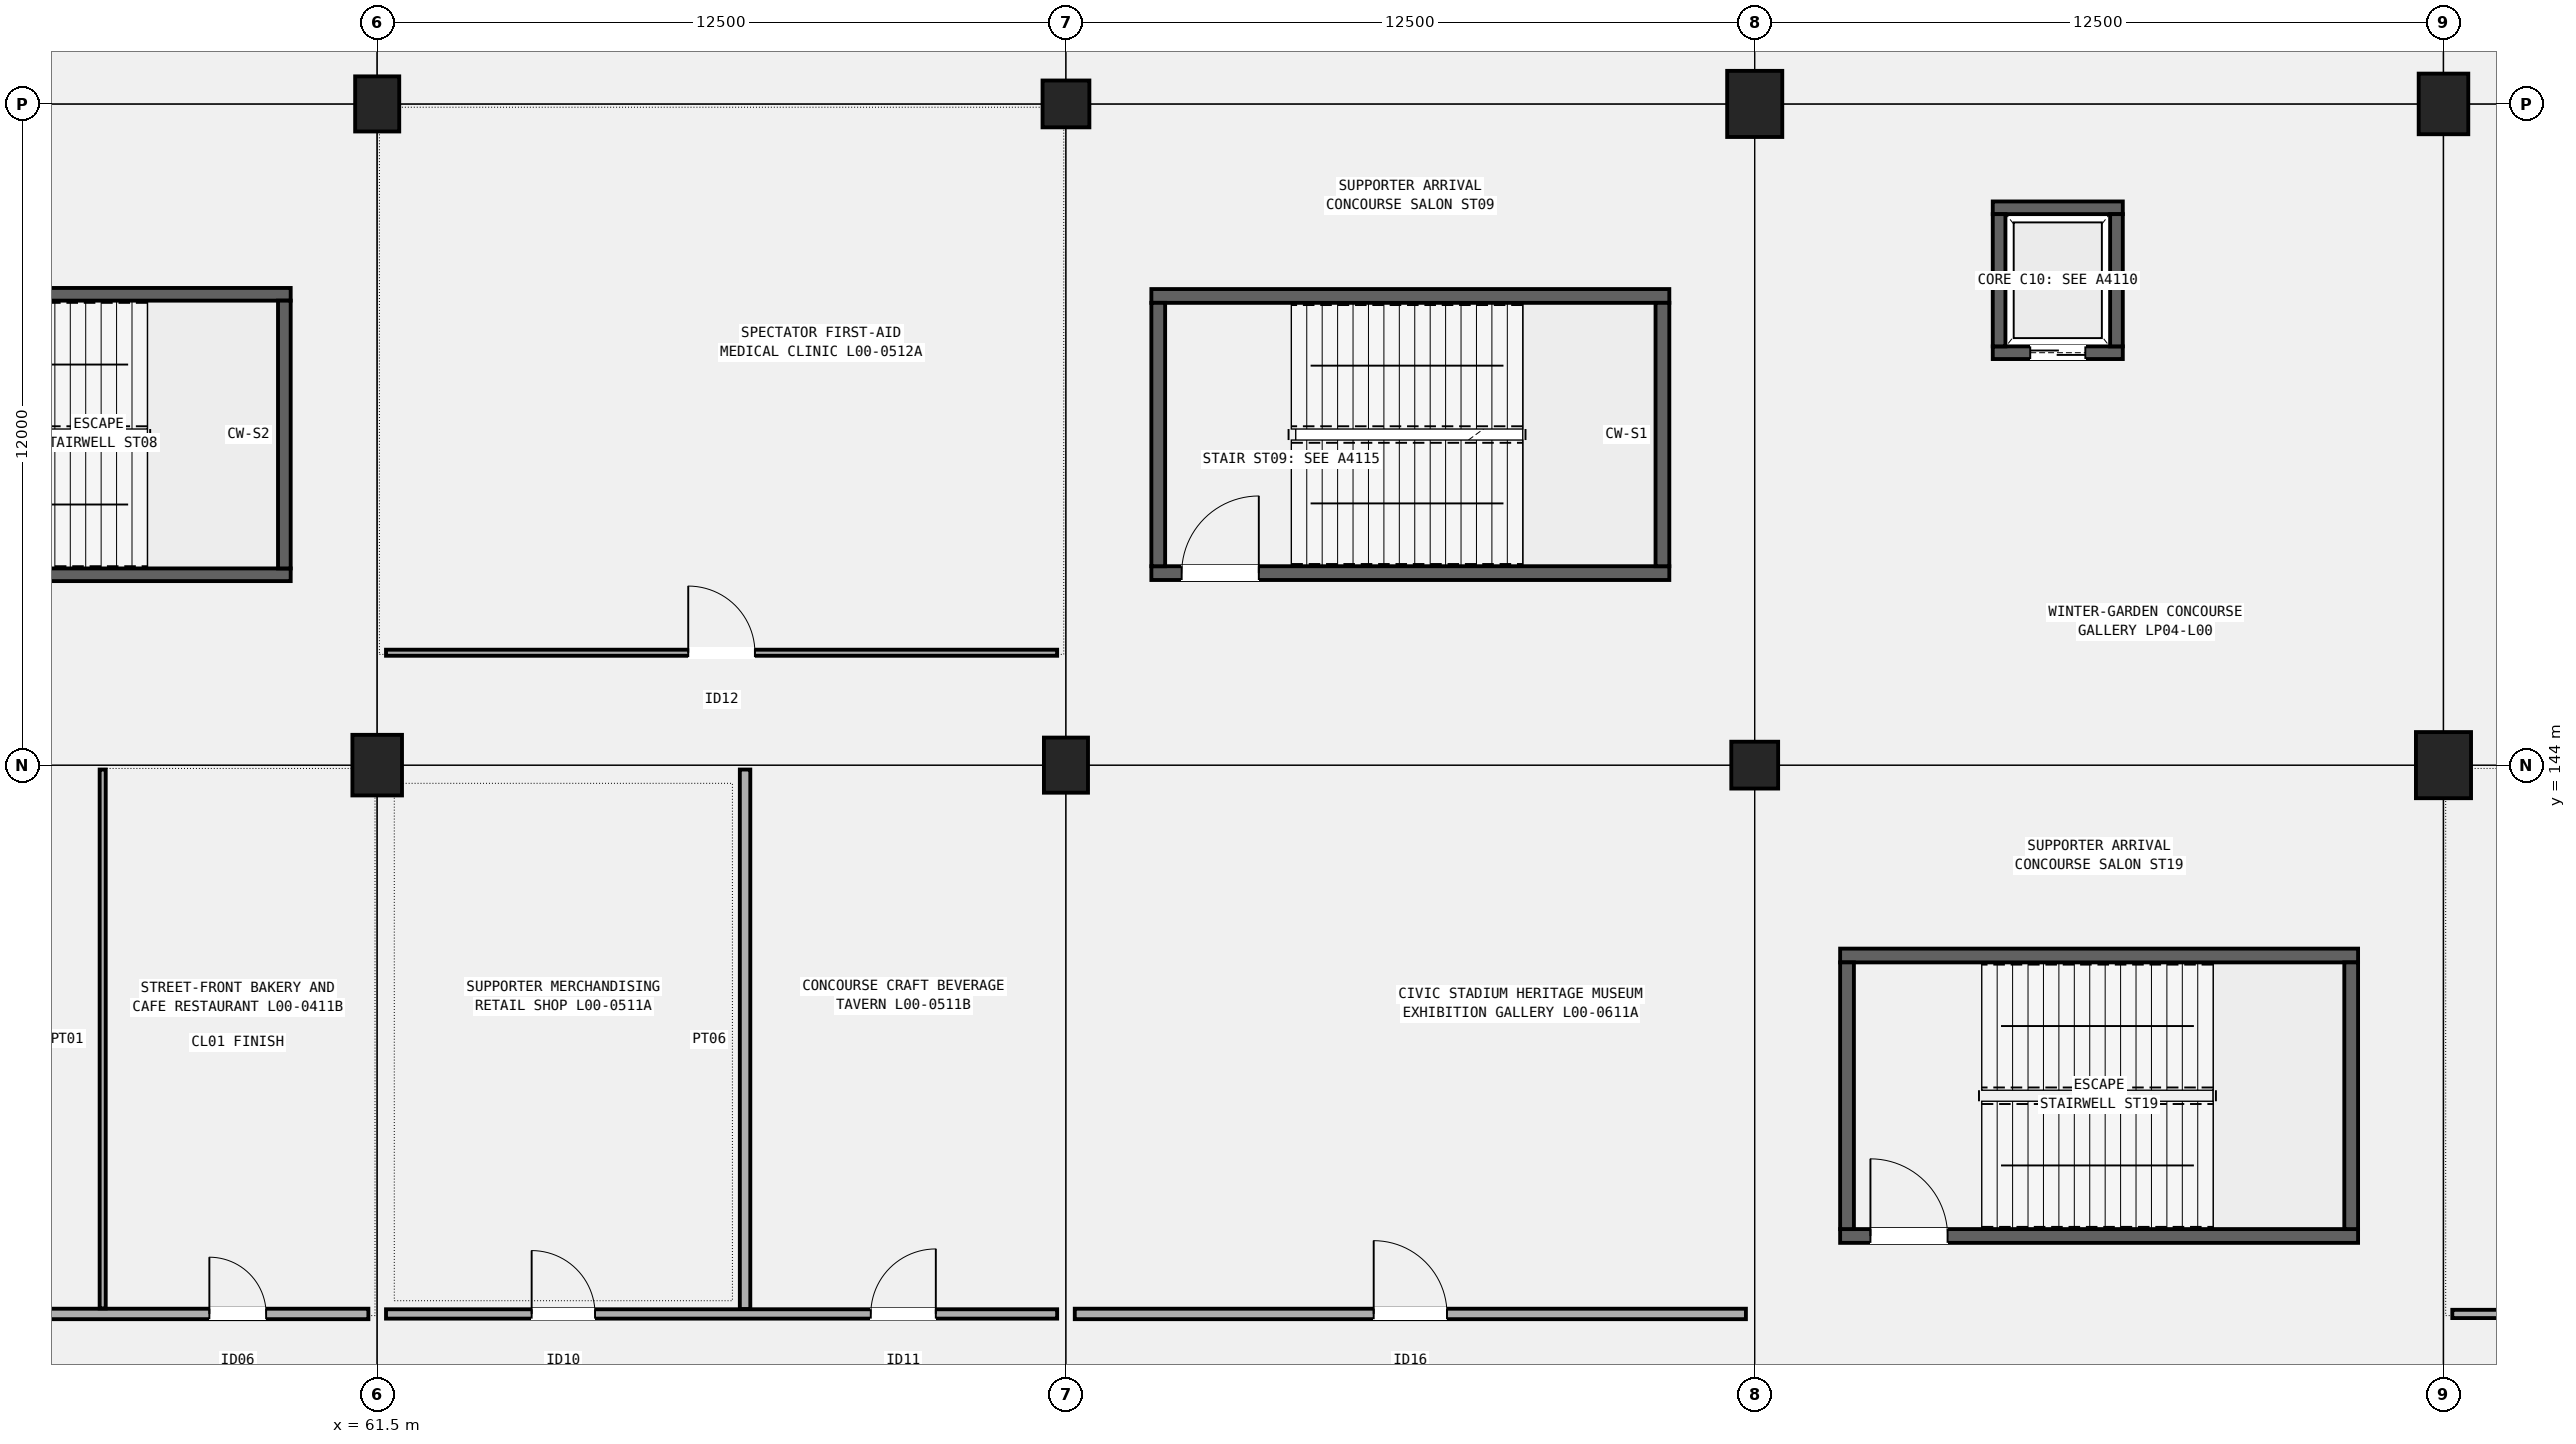
"""IFC4 building model, lengths in metres.
Left out: names, types, materials, properties, quantities, classifications, styles, units other than length and angle.
Written with IfcOpenShell. Run it as: python <this file> out.ifc"""

import sys

from ifc_helpers import new_model, si_unit, direction, frame, frame_2d, origin, origin_2d, place, context, subcontext, project, spatial, rectangle, circle, extrude, element, fill, save


model = new_model("IFC4")
c1 = context("Model", 3, precision=1e-05, world=origin(), true_north=direction((0.0, 1.0)))
c2 = subcontext(c1, "Body", "Model", "MODEL_VIEW")
j1 = project(units=[si_unit("LENGTHUNIT", "METRE"), si_unit("PLANEANGLEUNIT", "RADIAN")], contexts=[c1])
p1 = place(None, origin())
s1 = spatial("IfcSite", under=j1, at=p1, CompositionType="ELEMENT")
p2 = place(p1, origin())
s2 = spatial("IfcBuilding", under=s1, at=p2, CompositionType="ELEMENT")
p3 = place(p2, origin())
s3 = spatial("IfcBuildingStorey", under=s2, at=p3, CompositionType="ELEMENT", Elevation=0.0)
p4 = place(p3, frame((61.5, 144.0, 0.0), z_axis=(0.0, 0.0, 1.0), x_axis=(1.0, 0.0, 0.0)))
e1 = element("IfcColumn", 1, at=p4, inside=s3, PredefinedType="COLUMN", context=c2, shape_type="SweptSolid", body=[
    extrude(rectangle(XDim=0.9, YDim=1.1, at=origin_2d()), origin(), (0.0, 0.0, 1.0), 5.4),
])
for number, where, z_axis, x_axis in (
    (2, (61.5, 156.0, 0.0), (0.0, 0.0, 1.0), (1.0, 0.0, 0.0)),
    (3, (74.0, 144.0, 0.0), (0.0, 0.0, 1.0), (1.0, 0.0, 0.0)),
):
    element("IfcColumn", number, at=place(p3, frame(where, z_axis=z_axis, x_axis=x_axis)), inside=s3, PredefinedType="COLUMN", context=c2, shape_type="SweptSolid", body=[
        extrude(rectangle(XDim=0.8, YDim=1.0, at=origin_2d()), origin(), (0.0, 0.0, 1.0), 5.4),
    ])
for number, where, z_axis, x_axis in (
    (4, (74.0, 156.0, 0.0), (0.0, 0.0, 1.0), (1.0, 0.0, 0.0)),
    (5, (86.5, 144.0, 0.0), (0.0, 0.0, 1.0), (1.0, 0.0, 0.0)),
):
    element("IfcColumn", number, at=place(p3, frame(where, z_axis=z_axis, x_axis=x_axis)), inside=s3, PredefinedType="COLUMN", context=c2, shape_type="SweptSolid", body=[
        extrude(circle(Radius=0.425, at=origin_2d()), origin(), (0.0, 0.0, 1.0), 5.4),
    ])
for number, where, z_axis, x_axis in (
    (6, (86.5, 156.0, 0.0), (0.0, 0.0, 1.0), (1.0, 0.0, 0.0)),
    (7, (99.0, 144.0, 0.0), (0.0, 0.0, 1.0), (1.0, 0.0, 0.0)),
):
    element("IfcColumn", number, at=place(p3, frame(where, z_axis=z_axis, x_axis=x_axis)), inside=s3, PredefinedType="COLUMN", context=c2, shape_type="SweptSolid", body=[
        extrude(rectangle(XDim=1.0, YDim=1.2, at=origin_2d()), origin(), (0.0, 0.0, 1.0), 5.4),
    ])
p5 = place(p3, frame((99.0, 156.0, 0.0), z_axis=(0.0, 0.0, 1.0), x_axis=(1.0, 0.0, 0.0)))
e8 = element("IfcColumn", 8, at=p5, inside=s3, PredefinedType="COLUMN", context=c2, shape_type="SweptSolid", body=[
    extrude(rectangle(XDim=0.9, YDim=1.1, at=origin_2d()), origin(), (0.0, 0.0, 1.0), 5.4),
])
p6 = place(p3, frame((50.57, 147.455, 0.0), z_axis=(0.0, 0.0, 1.0), x_axis=(1.0, 0.0, 0.0)))
e9 = element("IfcWall", 9, at=p6, inside=s3, PredefinedType="SHEAR", context=c2, shape_type="SweptSolid", body=[
    extrude(rectangle(XDim=9.36, YDim=0.23, at=frame_2d((4.68, 0.0))), origin(), (0.0, 0.0, 1.0), 5.14),
])
p7 = place(p6, frame((0.55, 0.0, 0.0)))
e10 = element("IfcOpeningElement", 10, at=p7, cuts=e9, PredefinedType="OPENING", context=c2, shape_type="SweptSolid", body=[
    extrude(rectangle(XDim=1.5, YDim=2.2, at=frame_2d((0.75, 1.1))), frame((0.0, 0.125, 0.0), z_axis=(0.0, -1.0, 0.0), x_axis=(1.0, 0.0, 0.0)), (0.0, 0.0, 1.0), 0.25),
])
p8 = place(p3, frame((50.57, 152.545, 0.0), z_axis=(0.0, 0.0, 1.0), x_axis=(1.0, 0.0, 0.0)))
e11 = element("IfcWall", 11, at=p8, inside=s3, PredefinedType="SHEAR", context=c2, shape_type="SweptSolid", body=[
    extrude(rectangle(XDim=9.36, YDim=0.23, at=frame_2d((4.68, 0.0))), origin(), (0.0, 0.0, 1.0), 5.14),
])
p9 = place(p3, frame((59.815, 147.57, 0.0), z_axis=(0.0, 0.0, 1.0), x_axis=(0.0, 1.0, 0.0)))
e12 = element("IfcWall", 12, at=p9, inside=s3, PredefinedType="SHEAR", context=c2, shape_type="SweptSolid", body=[
    extrude(rectangle(XDim=4.86, YDim=0.23, at=frame_2d((2.43, 0.0))), origin(), (0.0, 0.0, 1.0), 5.14),
])
p10 = place(p3, frame((75.55, 147.485, 0.0), z_axis=(0.0, 0.0, 1.0), x_axis=(1.0, 0.0, 0.0)))
e13 = element("IfcWall", 13, at=p10, inside=s3, PredefinedType="SHEAR", context=c2, shape_type="SweptSolid", body=[
    extrude(rectangle(XDim=9.4, YDim=0.25, at=frame_2d((4.7, 0.0))), origin(), (0.0, 0.0, 1.0), 5.14),
])
p11 = place(p10, frame((0.55, 0.0, 0.0)))
e14 = element("IfcOpeningElement", 14, at=p11, cuts=e13, PredefinedType="OPENING", context=c2, shape_type="SweptSolid", body=[
    extrude(rectangle(XDim=1.4, YDim=2.15, at=frame_2d((0.7, 1.075))), frame((0.0, 0.135, 0.0), z_axis=(0.0, -1.0, 0.0), x_axis=(1.0, 0.0, 0.0)), (0.0, 0.0, 1.0), 0.27),
])
p12 = place(p3, frame((75.55, 152.515, 0.0), z_axis=(0.0, 0.0, 1.0), x_axis=(1.0, 0.0, 0.0)))
e15 = element("IfcWall", 15, at=p12, inside=s3, PredefinedType="SHEAR", context=c2, shape_type="SweptSolid", body=[
    extrude(rectangle(XDim=9.4, YDim=0.25, at=frame_2d((4.7, 0.0))), origin(), (0.0, 0.0, 1.0), 5.14),
])
for number, where, z_axis, x_axis in (
    (16, (75.675, 147.61, 0.0), (0.0, 0.0, 1.0), (0.0, 1.0, 0.0)),
    (17, (84.825, 147.61, 0.0), (0.0, 0.0, 1.0), (0.0, 1.0, 0.0)),
):
    element("IfcWall", number, at=place(p3, frame(where, z_axis=z_axis, x_axis=x_axis)), inside=s3, PredefinedType="SHEAR", context=c2, shape_type="SweptSolid", body=[
        extrude(rectangle(XDim=4.78, YDim=0.25, at=frame_2d((2.39, 0.0))), origin(), (0.0, 0.0, 1.0), 5.14),
    ])
p13 = place(p3, frame((88.05, 135.455, 0.0), z_axis=(0.0, 0.0, 1.0), x_axis=(1.0, 0.0, 0.0)))
e18 = element("IfcWall", 18, at=p13, inside=s3, PredefinedType="SHEAR", context=c2, shape_type="SweptSolid", body=[
    extrude(rectangle(XDim=9.4, YDim=0.25, at=frame_2d((4.7, 0.0))), origin(), (0.0, 0.0, 1.0), 5.14),
])
p14 = place(p13, frame((0.55, 0.0, 0.0)))
e19 = element("IfcOpeningElement", 19, at=p14, cuts=e18, PredefinedType="OPENING", context=c2, shape_type="SweptSolid", body=[
    extrude(rectangle(XDim=1.4, YDim=2.15, at=frame_2d((0.7, 1.075))), frame((0.0, 0.135, 0.0), z_axis=(0.0, -1.0, 0.0), x_axis=(1.0, 0.0, 0.0)), (0.0, 0.0, 1.0), 0.27),
])
p15 = place(p3, frame((88.05, 140.545, 0.0), z_axis=(0.0, 0.0, 1.0), x_axis=(1.0, 0.0, 0.0)))
e20 = element("IfcWall", 20, at=p15, inside=s3, PredefinedType="SHEAR", context=c2, shape_type="SweptSolid", body=[
    extrude(rectangle(XDim=9.4, YDim=0.25, at=frame_2d((4.7, 0.0))), origin(), (0.0, 0.0, 1.0), 5.14),
])
for number, where, z_axis, x_axis in (
    (21, (88.175, 135.58, 0.0), (0.0, 0.0, 1.0), (0.0, 1.0, 0.0)),
    (22, (97.325, 135.58, 0.0), (0.0, 0.0, 1.0), (0.0, 1.0, 0.0)),
):
    element("IfcWall", number, at=place(p3, frame(where, z_axis=z_axis, x_axis=x_axis)), inside=s3, PredefinedType="SHEAR", context=c2, shape_type="SweptSolid", body=[
        extrude(rectangle(XDim=4.84, YDim=0.25, at=frame_2d((2.42, 0.0))), origin(), (0.0, 0.0, 1.0), 5.14),
    ])
p16 = place(p3, frame((90.82, 151.485, 0.0), z_axis=(0.0, 0.0, 1.0), x_axis=(1.0, 0.0, 0.0)))
e23 = element("IfcWall", 23, at=p16, inside=s3, PredefinedType="SHEAR", context=c2, shape_type="SweptSolid", body=[
    extrude(rectangle(XDim=2.36, YDim=0.23, at=frame_2d((1.18, 0.0))), origin(), (0.0, 0.0, 1.0), 5.14),
])
p17 = place(p16, frame((0.68, 0.0, 0.0)))
e24 = element("IfcOpeningElement", 24, at=p17, cuts=e23, PredefinedType="OPENING", context=c2, shape_type="SweptSolid", body=[
    extrude(rectangle(XDim=1.0, YDim=2.15, at=frame_2d((0.5, 1.075))), frame((0.0, 0.125, 0.0), z_axis=(0.0, -1.0, 0.0), x_axis=(1.0, 0.0, 0.0)), (0.0, 0.0, 1.0), 0.25),
])
p18 = place(p3, frame((90.82, 154.115, 0.0), z_axis=(0.0, 0.0, 1.0), x_axis=(1.0, 0.0, 0.0)))
e25 = element("IfcWall", 25, at=p18, inside=s3, PredefinedType="SHEAR", context=c2, shape_type="SweptSolid", body=[
    extrude(rectangle(XDim=2.36, YDim=0.23, at=frame_2d((1.18, 0.0))), origin(), (0.0, 0.0, 1.0), 5.14),
])
for number, where, z_axis, x_axis in (
    (26, (90.935, 151.6, 0.0), (0.0, 0.0, 1.0), (0.0, 1.0, 0.0)),
    (27, (93.065, 151.6, 0.0), (0.0, 0.0, 1.0), (0.0, 1.0, 0.0)),
):
    element("IfcWall", number, at=place(p3, frame(where, z_axis=z_axis, x_axis=x_axis)), inside=s3, PredefinedType="SHEAR", context=c2, shape_type="SweptSolid", body=[
        extrude(rectangle(XDim=2.4, YDim=0.23, at=frame_2d((1.2, 0.0))), origin(), (0.0, 0.0, 1.0), 5.14),
    ])
p19 = place(p3, frame((50.97, 134.04, 0.0), z_axis=(0.0, 0.0, 1.0), x_axis=(1.0, 0.0, 0.0)))
e28 = element("IfcWall", 28, at=p19, inside=s3, PredefinedType="PARTITIONING", context=c2, shape_type="SweptSolid", body=[
    extrude(rectangle(XDim=10.37, YDim=0.19, at=frame_2d((5.185, 0.0))), origin(), (0.0, 0.0, 1.0), 4.52),
])
p20 = place(p19, frame((2.234, 0.0, 0.0)))
e29 = element("IfcOpeningElement", 29, at=p20, cuts=e28, PredefinedType="OPENING", context=c2, shape_type="SweptSolid", body=[
    extrude(rectangle(XDim=1.0, YDim=2.14, at=frame_2d((0.5, 1.07))), frame((0.0, 0.105, 0.0), z_axis=(0.0, -1.0, 0.0), x_axis=(1.0, 0.0, 0.0)), (0.0, 0.0, 1.0), 0.21),
])
p21 = place(p19, frame((7.484, 0.0, 0.0)))
e30 = element("IfcOpeningElement", 30, at=p21, cuts=e28, PredefinedType="OPENING", context=c2, shape_type="SweptSolid", body=[
    extrude(rectangle(XDim=1.03, YDim=2.12, at=frame_2d((0.515, 1.06))), frame((0.0, 0.105, 0.0), z_axis=(0.0, -1.0, 0.0), x_axis=(1.0, 0.0, 0.0)), (0.0, 0.0, 1.0), 0.21),
])
p22 = place(p3, frame((56.518, 134.14, 0.0), z_axis=(0.0, 0.0, 1.0), x_axis=(0.0, 1.0, 0.0)))
e31 = element("IfcWall", 31, at=p22, inside=s3, PredefinedType="PARTITIONING", context=c2, shape_type="SweptSolid", body=[
    extrude(rectangle(XDim=9.78, YDim=0.11, at=frame_2d((4.89, 0.0))), origin(), (0.0, 0.0, 1.0), 4.52),
])
p23 = place(p3, frame((61.66, 134.04, 0.0), z_axis=(0.0, 0.0, 1.0), x_axis=(1.0, 0.0, 0.0)))
e32 = element("IfcWall", 32, at=p23, inside=s3, PredefinedType="PARTITIONING", context=c2, shape_type="SweptSolid", body=[
    extrude(rectangle(XDim=12.18, YDim=0.17, at=frame_2d((6.09, 0.0))), origin(), (0.0, 0.0, 1.0), 4.52),
])
p24 = place(p23, frame((2.643, 0.0, 0.0)))
e33 = element("IfcOpeningElement", 33, at=p24, cuts=e32, PredefinedType="OPENING", context=c2, shape_type="SweptSolid", body=[
    extrude(rectangle(XDim=1.15, YDim=2.15, at=frame_2d((0.575, 1.075))), frame((0.0, 0.095, 0.0), z_axis=(0.0, -1.0, 0.0), x_axis=(1.0, 0.0, 0.0)), (0.0, 0.0, 1.0), 0.19),
])
p25 = place(p23, frame((8.798, 0.0, 0.0)))
e34 = element("IfcOpeningElement", 34, at=p25, cuts=e32, PredefinedType="OPENING", context=c2, shape_type="SweptSolid", body=[
    extrude(rectangle(XDim=1.18, YDim=2.2, at=frame_2d((0.59, 1.1))), frame((0.0, 0.095, 0.0), z_axis=(0.0, -1.0, 0.0), x_axis=(1.0, 0.0, 0.0)), (0.0, 0.0, 1.0), 0.19),
])
p26 = place(p3, frame((68.176, 134.13, 0.0), z_axis=(0.0, 0.0, 1.0), x_axis=(0.0, 1.0, 0.0)))
e35 = element("IfcWall", 35, at=p26, inside=s3, PredefinedType="PARTITIONING", context=c2, shape_type="SweptSolid", body=[
    extrude(rectangle(XDim=9.79, YDim=0.19, at=frame_2d((4.895, 0.0))), origin(), (0.0, 0.0, 1.0), 4.52),
])
p27 = place(p3, frame((61.66, 146.04, 0.0), z_axis=(0.0, 0.0, 1.0), x_axis=(1.0, 0.0, 0.0)))
e36 = element("IfcWall", 36, at=p27, inside=s3, PredefinedType="PARTITIONING", context=c2, shape_type="SweptSolid", body=[
    extrude(rectangle(XDim=12.18, YDim=0.11, at=frame_2d((6.09, 0.0))), origin(), (0.0, 0.0, 1.0), 4.52),
])
p28 = place(p27, frame((5.485, 0.0, 0.0)))
e37 = element("IfcOpeningElement", 37, at=p28, cuts=e36, PredefinedType="OPENING", context=c2, shape_type="SweptSolid", body=[
    extrude(rectangle(XDim=1.21, YDim=2.18, at=frame_2d((0.605, 1.09))), frame((0.0, 0.065, 0.0), z_axis=(0.0, -1.0, 0.0), x_axis=(1.0, 0.0, 0.0)), (0.0, 0.0, 1.0), 0.13),
])
p29 = place(p3, frame((74.16, 134.04, 0.0), z_axis=(0.0, 0.0, 1.0), x_axis=(1.0, 0.0, 0.0)))
e38 = element("IfcWall", 38, at=p29, inside=s3, PredefinedType="PARTITIONING", context=c2, shape_type="SweptSolid", body=[
    extrude(rectangle(XDim=12.18, YDim=0.19, at=frame_2d((6.09, 0.0))), origin(), (0.0, 0.0, 1.0), 4.52),
])
p30 = place(p29, frame((5.425, 0.0, 0.0)))
e39 = element("IfcOpeningElement", 39, at=p30, cuts=e38, PredefinedType="OPENING", context=c2, shape_type="SweptSolid", body=[
    extrude(rectangle(XDim=1.33, YDim=2.22, at=frame_2d((0.665, 1.11))), frame((0.0, 0.105, 0.0), z_axis=(0.0, -1.0, 0.0), x_axis=(1.0, 0.0, 0.0)), (0.0, 0.0, 1.0), 0.21),
])
p31 = place(p3, frame((99.16, 134.04, 0.0), z_axis=(0.0, 0.0, 1.0), x_axis=(1.0, 0.0, 0.0)))
e40 = element("IfcWall", 40, at=p31, inside=s3, PredefinedType="PARTITIONING", context=c2, shape_type="SweptSolid", body=[
    extrude(rectangle(XDim=12.68, YDim=0.15, at=frame_2d((6.34, 0.0))), origin(), (0.0, 0.0, 1.0), 4.52),
])
p32 = place(p31, frame((2.502, 0.0, 0.0)))
e41 = element("IfcOpeningElement", 41, at=p32, cuts=e40, PredefinedType="OPENING", context=c2, shape_type="SweptSolid", body=[
    extrude(rectangle(XDim=1.7, YDim=2.32, at=frame_2d((0.85, 1.16))), frame((0.0, 0.085, 0.0), z_axis=(0.0, -1.0, 0.0), x_axis=(1.0, 0.0, 0.0)), (0.0, 0.0, 1.0), 0.17),
])
p33 = place(p31, frame((8.892, 0.0, 0.0)))
e42 = element("IfcOpeningElement", 42, at=p33, cuts=e40, PredefinedType="OPENING", context=c2, shape_type="SweptSolid", body=[
    extrude(rectangle(XDim=1.76, YDim=2.3, at=frame_2d((0.88, 1.15))), frame((0.0, 0.085, 0.0), z_axis=(0.0, -1.0, 0.0), x_axis=(1.0, 0.0, 0.0)), (0.0, 0.0, 1.0), 0.17),
])
p34 = place(p11, origin())
e43 = element("IfcDoor", 43, at=p34, inside=s3, OperationType="SINGLE_SWING_RIGHT", PredefinedType="DOOR", context=c2, shape_type="SweptSolid", body=[
    extrude(rectangle(XDim=1.4, YDim=2.15, at=frame_2d((0.7, 1.075))), frame((0.0, 0.025, 0.0), z_axis=(0.0, -1.0, 0.0), x_axis=(1.0, 0.0, 0.0)), (0.0, 0.0, 1.0), 0.05),
])
fill(e14, e43)
p35 = place(p14, origin())
e44 = element("IfcDoor", 44, at=p35, inside=s3, OperationType="SINGLE_SWING_LEFT", PredefinedType="DOOR", context=c2, shape_type="SweptSolid", body=[
    extrude(rectangle(XDim=1.4, YDim=2.15, at=frame_2d((0.7, 1.075))), frame((0.0, 0.025, 0.0), z_axis=(0.0, -1.0, 0.0), x_axis=(1.0, 0.0, 0.0)), (0.0, 0.0, 1.0), 0.05),
])
fill(e19, e44)
p36 = place(p17, origin())
e45 = element("IfcDoor", 45, at=p36, inside=s3, OperationType="DOUBLE_DOOR_SLIDING", PredefinedType="DOOR", context=c2, shape_type="SweptSolid", body=[
    extrude(rectangle(XDim=1.0, YDim=2.15, at=frame_2d((0.5, 1.075))), frame((0.0, 0.025, 0.0), z_axis=(0.0, -1.0, 0.0), x_axis=(1.0, 0.0, 0.0)), (0.0, 0.0, 1.0), 0.05),
])
fill(e24, e45)
p37 = place(p21, origin())
e46 = element("IfcDoor", 46, at=p37, inside=s3, OperationType="SINGLE_SWING_LEFT", PredefinedType="DOOR", context=c2, shape_type="SweptSolid", body=[
    extrude(rectangle(XDim=1.03, YDim=2.12, at=frame_2d((0.515, 1.06))), frame((0.0, 0.025, 0.0), z_axis=(0.0, -1.0, 0.0), x_axis=(1.0, 0.0, 0.0)), (0.0, 0.0, 1.0), 0.05),
])
fill(e30, e46)
p38 = place(p24, origin())
e47 = element("IfcDoor", 47, at=p38, inside=s3, OperationType="SINGLE_SWING_LEFT", PredefinedType="DOOR", context=c2, shape_type="SweptSolid", body=[
    extrude(rectangle(XDim=1.15, YDim=2.15, at=frame_2d((0.575, 1.075))), frame((0.0, 0.025, 0.0), z_axis=(0.0, -1.0, 0.0), x_axis=(1.0, 0.0, 0.0)), (0.0, 0.0, 1.0), 0.05),
])
fill(e33, e47)
p39 = place(p25, origin())
e48 = element("IfcDoor", 48, at=p39, inside=s3, OperationType="SINGLE_SWING_RIGHT", PredefinedType="DOOR", context=c2, shape_type="SweptSolid", body=[
    extrude(rectangle(XDim=1.18, YDim=2.2, at=frame_2d((0.59, 1.1))), frame((0.0, 0.025, 0.0), z_axis=(0.0, -1.0, 0.0), x_axis=(1.0, 0.0, 0.0)), (0.0, 0.0, 1.0), 0.05),
])
fill(e34, e48)
p40 = place(p28, origin())
e49 = element("IfcDoor", 49, at=p40, inside=s3, OperationType="SINGLE_SWING_LEFT", PredefinedType="DOOR", context=c2, shape_type="SweptSolid", body=[
    extrude(rectangle(XDim=1.21, YDim=2.18, at=frame_2d((0.605, 1.09))), frame((0.0, 0.025, 0.0), z_axis=(0.0, -1.0, 0.0), x_axis=(1.0, 0.0, 0.0)), (0.0, 0.0, 1.0), 0.05),
])
fill(e37, e49)
p41 = place(p30, origin())
e50 = element("IfcDoor", 50, at=p41, inside=s3, OperationType="SINGLE_SWING_LEFT", PredefinedType="DOOR", context=c2, shape_type="SweptSolid", body=[
    extrude(rectangle(XDim=1.33, YDim=2.22, at=frame_2d((0.665, 1.11))), frame((0.0, 0.025, 0.0), z_axis=(0.0, -1.0, 0.0), x_axis=(1.0, 0.0, 0.0)), (0.0, 0.0, 1.0), 0.05),
])
fill(e39, e50)
save(model, sys.argv[1])
